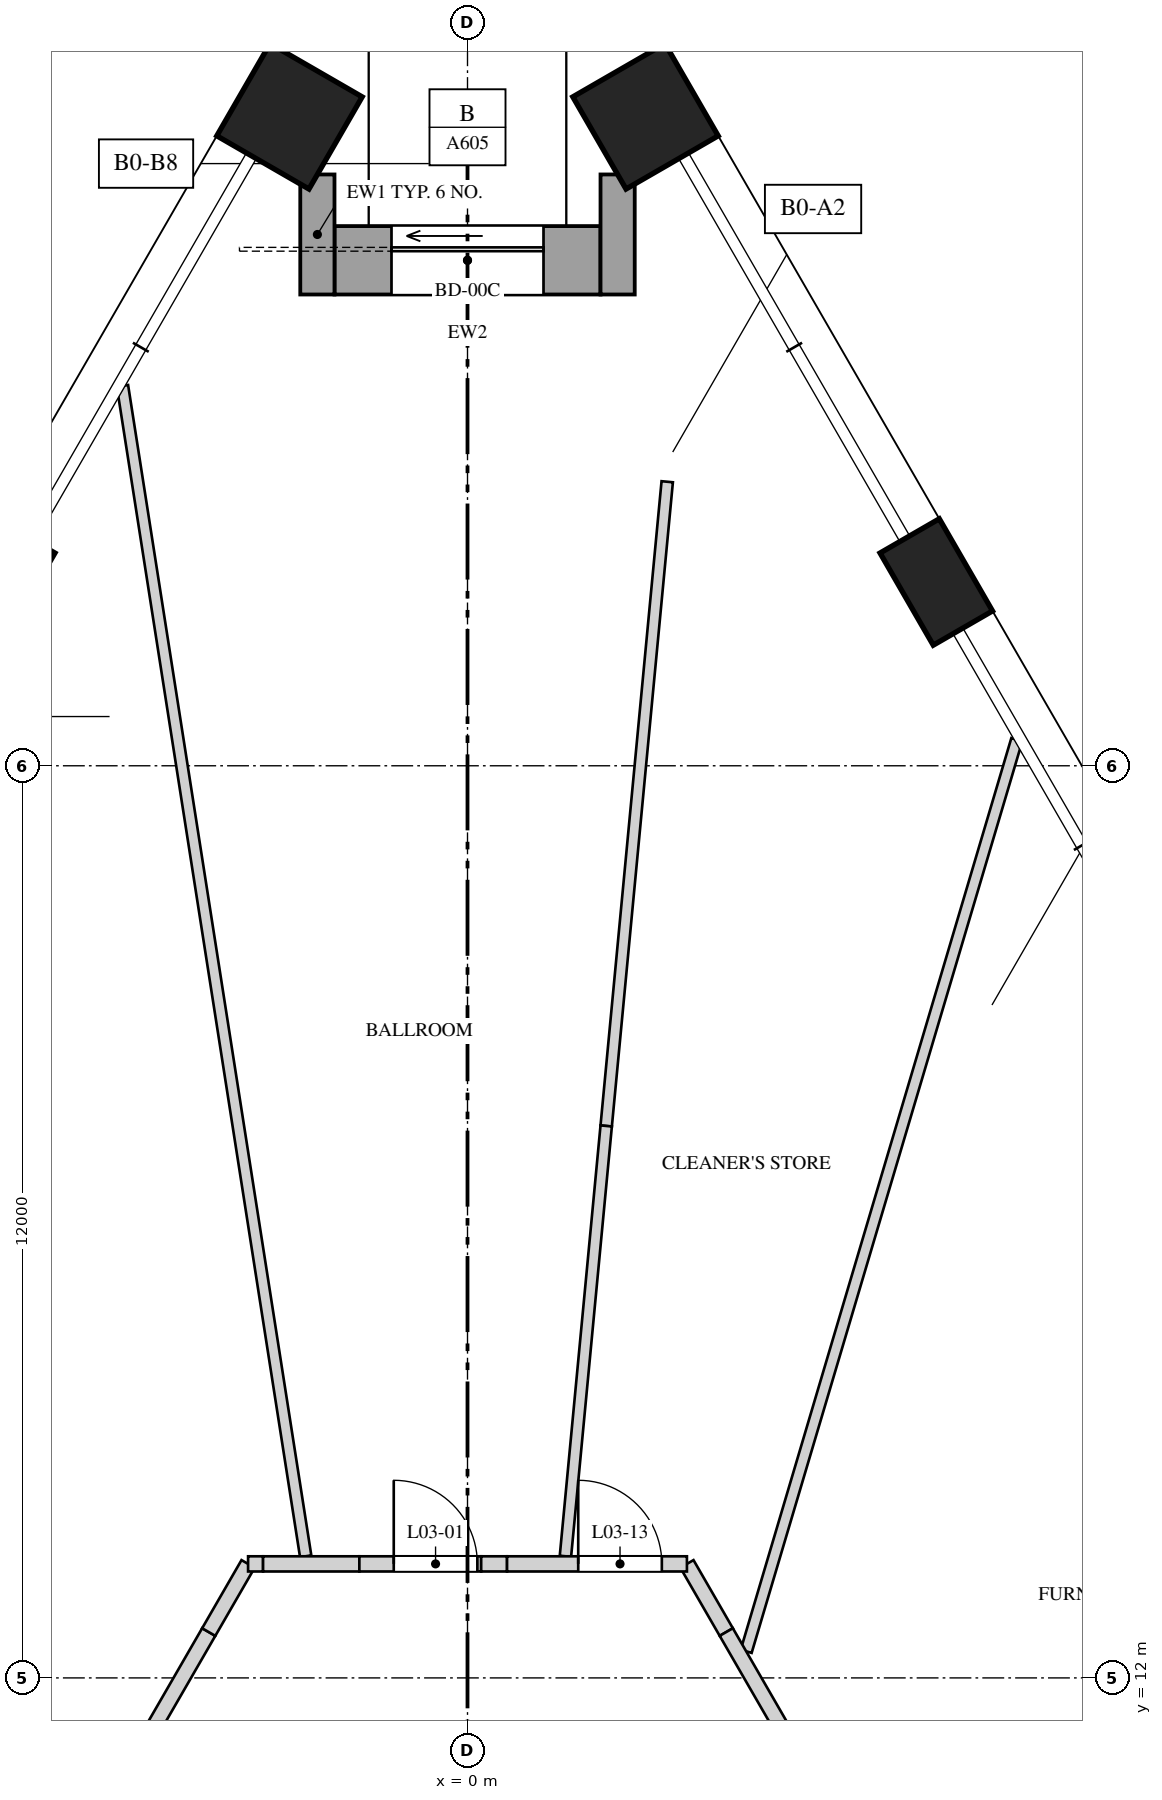
"""IFC4 building model, lengths in metres.
Left out: names, types, materials, properties, quantities, classifications, styles, units other than length and angle.
Written with IfcOpenShell. Run it as: python <this file> out.ifc"""

import sys

from ifc_helpers import new_model, si_unit, direction, frame, frame_2d, origin, origin_2d, place, context, subcontext, project, spatial, polyline, rectangle, outline, extrude, element, fill, save


model = new_model("IFC4")
c1 = context("Model", 3, precision=1e-05, world=origin(), true_north=direction((0.0, 1.0)))
c2 = subcontext(c1, "Body", "Model", "MODEL_VIEW")
j1 = project(units=[si_unit("LENGTHUNIT", "METRE"), si_unit("PLANEANGLEUNIT", "RADIAN")], contexts=[c1])
p1 = place(None, origin())
s1 = spatial("IfcSite", under=j1, at=p1, CompositionType="ELEMENT")
p2 = place(p1, origin())
s2 = spatial("IfcBuilding", under=s1, at=p2, CompositionType="ELEMENT")
p3 = place(p2, frame((0.0, 0.0, 20.0)))
s3 = spatial("IfcBuildingStorey", under=s2, at=p3, CompositionType="ELEMENT", Elevation=20.0)
p4 = place(p3, frame((-2.342, 32.544, 0.0), z_axis=(0.0, 0.0, 1.0), x_axis=(-0.5, -0.866025403784, 0.0)))
e1 = element("IfcColumn", 1, at=p4, inside=s3, PredefinedType="COLUMN", context=c2, shape_type="SweptSolid", body=[
    extrude(rectangle(XDim=1.4, YDim=1.4, at=origin_2d()), origin(), (0.0, 0.0, 1.0), 5.0),
])
for number, where, z_axis, x_axis in (
    (2, (-6.167, 26.418, 0.0), (0.0, 0.0, 1.0), (-0.5, -0.866, 0.0)),
    (3, (6.167, 26.418, 0.0), (0.0, 0.0, 1.0), (-0.5, 0.866, 0.0)),
):
    element("IfcColumn", number, at=place(p3, frame(where, z_axis=z_axis, x_axis=x_axis)), inside=s3, PredefinedType="COLUMN", context=c2, shape_type="SweptSolid", body=[
        extrude(rectangle(XDim=1.4, YDim=0.9, at=origin_2d()), origin(), (0.0, 0.0, 1.0), 5.0),
    ])
p5 = place(p3, frame((2.342, 32.544, 0.0), z_axis=(0.0, 0.0, 1.0), x_axis=(-0.5, 0.866025403784, 0.0)))
e4 = element("IfcColumn", 4, at=p5, inside=s3, PredefinedType="COLUMN", context=c2, shape_type="SweptSolid", body=[
    extrude(rectangle(XDim=1.4, YDim=1.4, at=origin_2d()), origin(), (0.0, 0.0, 1.0), 5.0),
])
p6 = place(p3, frame((-1.75, 30.65, 0.0), z_axis=(0.0, 0.0, 1.0), x_axis=(1.0, 0.0, 0.0)))
e5 = element("IfcWall", 5, at=p6, inside=s3, PredefinedType="SOLIDWALL", context=c2, shape_type="SweptSolid", body=[
    extrude(rectangle(XDim=3.5, YDim=0.9, at=frame_2d((1.75, 0.0))), origin(), (0.0, 0.0, 1.0), 4.3),
])
p7 = place(p6, frame((0.75, 0.0, 0.0)))
e6 = element("IfcOpeningElement", 6, at=p7, cuts=e5, PredefinedType="OPENING", context=c2, shape_type="SweptSolid", body=[
    extrude(rectangle(XDim=2.0, YDim=2.4, at=frame_2d((1.0, 1.2))), frame((0.0, 0.46, 0.0), z_axis=(0.0, -1.0, 0.0), x_axis=(1.0, 0.0, 0.0)), (0.0, 0.0, 1.0), 0.92),
])
for number, where, z_axis, x_axis in (
    (7, (-1.975, 31.779, 0.0), (0.0, 0.0, 1.0), (0.0, -1.0, 0.0)),
    (8, (1.975, 31.779, 0.0), (0.0, 0.0, 1.0), (0.0, -1.0, 0.0)),
):
    element("IfcWall", number, at=place(p3, frame(where, z_axis=z_axis, x_axis=x_axis)), inside=s3, PredefinedType="SOLIDWALL", context=c2, shape_type="SweptSolid", body=[
        extrude(rectangle(XDim=1.579, YDim=0.45, at=frame_2d((0.79, 0.0))), origin(), (0.0, 0.0, 1.0), 2.55),
    ])
p8 = place(p3, frame((-2.129, 13.6, 0.0), z_axis=(0.0, 0.0, 1.0), x_axis=(-0.154659289673, 0.987967865934, 0.0)))
e9 = element("IfcWall", 9, at=p8, inside=s3, PredefinedType="PARTITIONING", context=c2, shape_type="SweptSolid", body=[
    extrude(rectangle(XDim=15.585, YDim=0.15, at=frame_2d((7.792, 0.0))), origin(), (0.0, 0.0, 1.0), 4.65),
])
p9 = place(p3, frame((2.628, 27.737, 0.0), z_axis=(0.0, 0.0, 1.0), x_axis=(-0.094320531398, -0.995541881267, 0.0)))
e10 = element("IfcWall", 10, at=p9, inside=s3, PredefinedType="PARTITIONING", context=c2, shape_type="SweptSolid", body=[
    extrude(rectangle(XDim=8.513, YDim=0.15, at=frame_2d((4.257, 0.0))), origin(), (0.0, 0.0, 1.0), 4.65),
])
p10 = place(p3, frame((1.825, 19.261, 0.0), z_axis=(0.0, 0.0, 1.0), x_axis=(-0.094320818209, -0.995541854094, 0.0)))
e11 = element("IfcWall", 11, at=p10, inside=s3, PredefinedType="PARTITIONING", context=c2, shape_type="SweptSolid", body=[
    extrude(rectangle(XDim=5.687, YDim=0.15, at=frame_2d((2.843, 0.0))), origin(), (0.0, 0.0, 1.0), 3.55),
])
p11 = place(p3, frame((3.666, 12.35, 0.0), z_axis=(0.0, 0.0, 1.0), x_axis=(0.284585958586, 0.958650526613, 0.0)))
e12 = element("IfcWall", 12, at=p11, inside=s3, PredefinedType="PARTITIONING", context=c2, shape_type="SweptSolid", body=[
    extrude(rectangle(XDim=12.51, YDim=0.15, at=frame_2d((6.255, 0.0))), origin(), (0.0, 0.0, 1.0), 4.65),
])
p12 = place(p3, frame((2.887, 13.5, 0.0), z_axis=(0.0, 0.0, 1.0), x_axis=(0.499994660107, -0.866028486751, 0.0)))
e13 = element("IfcWall", 13, at=p12, inside=s3, PredefinedType="SOLIDWALL", context=c2, shape_type="SweptSolid", body=[
    extrude(rectangle(XDim=1.035, YDim=0.2, at=frame_2d((0.518, 0.0))), origin(), (0.0, 0.0, 1.0), 3.55),
])
for number, where, z_axis, x_axis in (
    (14, (3.404, 12.604, 0.0), (0.0, 0.0, 1.0), (0.5, -0.866, 0.0)),
    (15, (-4.812, 10.165, 0.0), (0.0, 0.0, 1.0), (0.5, 0.866, 0.0)),
):
    element("IfcWall", number, at=place(p3, frame(where, z_axis=z_axis, x_axis=x_axis)), inside=s3, PredefinedType="SOLIDWALL", context=c2, shape_type="SweptSolid", body=[
        extrude(rectangle(XDim=2.815, YDim=0.2, at=frame_2d((1.408, 0.0))), origin(), (0.0, 0.0, 1.0), 4.65),
    ])
p13 = place(p3, frame((-3.404, 12.604, 0.0), z_axis=(0.0, 0.0, 1.0), x_axis=(0.499994660107, 0.866028486751, 0.0)))
e16 = element("IfcWall", 16, at=p13, inside=s3, PredefinedType="SOLIDWALL", context=c2, shape_type="SweptSolid", body=[
    extrude(rectangle(XDim=1.035, YDim=0.2, at=frame_2d((0.518, 0.0))), origin(), (0.0, 0.0, 1.0), 3.55),
])
p14 = place(p3, frame((-2.887, 13.5, 0.0), z_axis=(0.0, 0.0, 1.0), x_axis=(1.0, 0.0, 0.0)))
e17 = element("IfcWall", 17, at=p14, inside=s3, PredefinedType="SOLIDWALL", context=c2, shape_type="SweptSolid", body=[
    extrude(rectangle(XDim=0.197, YDim=0.2, at=frame_2d((0.099, 0.0))), origin(), (0.0, 0.0, 1.0), 3.55),
])
p15 = place(p3, frame((-2.689, 13.5, 0.0), z_axis=(0.0, 0.0, 1.0), x_axis=(1.0, 0.0, 0.0)))
e18 = element("IfcWall", 18, at=p15, inside=s3, PredefinedType="SOLIDWALL", context=c2, shape_type="SweptSolid", body=[
    extrude(rectangle(XDim=1.267, YDim=0.2, at=frame_2d((0.633, 0.0))), origin(), (0.0, 0.0, 1.0), 4.65),
])
p16 = place(p3, frame((-1.423, 13.5, 0.0), z_axis=(0.0, 0.0, 1.0), x_axis=(1.0, 0.0, 0.0)))
e19 = element("IfcWall", 19, at=p16, inside=s3, PredefinedType="SOLIDWALL", context=c2, shape_type="SweptSolid", body=[
    extrude(outline(polyline([(0.0, 0.0), (1.602, 0.0), (1.602, 4.65), (0.902, 4.65), (0.902, 3.55), (0.0, 3.55), (0.0, 0.0)])), frame((0.0, 0.1, 0.0), z_axis=(0.0, -1.0, 0.0), x_axis=(1.0, 0.0, 0.0)), (0.0, 0.0, 1.0), 0.2),
])
p17 = place(p16, frame((0.452, 0.0, 0.0)))
e20 = element("IfcOpeningElement", 20, at=p17, cuts=e19, PredefinedType="OPENING", context=c2, shape_type="SweptSolid", body=[
    extrude(rectangle(XDim=1.1, YDim=2.4, at=frame_2d((0.55, 1.2))), frame((0.0, 0.11, 0.0), z_axis=(0.0, -1.0, 0.0), x_axis=(1.0, 0.0, 0.0)), (0.0, 0.0, 1.0), 0.22),
])
p18 = place(p3, frame((0.18, 13.5, 0.0), z_axis=(0.0, 0.0, 1.0), x_axis=(1.0, 0.0, 0.0)))
e21 = element("IfcWall", 21, at=p18, inside=s3, PredefinedType="SOLIDWALL", context=c2, shape_type="SweptSolid", body=[
    extrude(rectangle(XDim=0.341, YDim=0.2, at=frame_2d((0.17, 0.0))), origin(), (0.0, 0.0, 1.0), 4.65),
])
p19 = place(p3, frame((0.52, 13.5, 0.0), z_axis=(0.0, 0.0, 1.0), x_axis=(1.0, 0.0, 0.0)))
e22 = element("IfcWall", 22, at=p19, inside=s3, PredefinedType="SOLIDWALL", context=c2, shape_type="SweptSolid", body=[
    extrude(outline(polyline([(0.0, 0.0), (2.366, 0.0), (2.366, 3.55), (2.169, 3.55), (2.169, 4.65), (0.902, 4.65), (0.902, 3.55), (0.0, 3.55), (0.0, 0.0)])), frame((0.0, 0.1, 0.0), z_axis=(0.0, -1.0, 0.0), x_axis=(1.0, 0.0, 0.0)), (0.0, 0.0, 1.0), 0.2),
])
p20 = place(p19, frame((0.936, 0.0, 0.0)))
e23 = element("IfcOpeningElement", 23, at=p20, cuts=e22, PredefinedType="OPENING", context=c2, shape_type="SweptSolid", body=[
    extrude(rectangle(XDim=1.1, YDim=2.4, at=frame_2d((0.55, 1.2))), frame((0.0, 0.11, 0.0), z_axis=(0.0, -1.0, 0.0), x_axis=(1.0, 0.0, 0.0)), (0.0, 0.0, 1.0), 0.22),
])
p21 = place(p7, origin())
e24 = element("IfcDoor", 24, at=p21, inside=s3, OperationType="SLIDING_TO_LEFT", PredefinedType="DOOR", context=c2, shape_type="SweptSolid", body=[
    extrude(rectangle(XDim=2.0, YDim=2.4, at=frame_2d((1.0, 1.2))), frame((0.0, 0.025, 0.0), z_axis=(0.0, -1.0, 0.0), x_axis=(1.0, 0.0, 0.0)), (0.0, 0.0, 1.0), 0.05),
])
fill(e6, e24)
p22 = place(p17, origin())
e25 = element("IfcDoor", 25, at=p22, inside=s3, OperationType="SINGLE_SWING_LEFT", PredefinedType="DOOR", context=c2, shape_type="SweptSolid", body=[
    extrude(rectangle(XDim=1.1, YDim=2.4, at=frame_2d((0.55, 1.2))), frame((0.0, 0.025, 0.0), z_axis=(0.0, -1.0, 0.0), x_axis=(1.0, 0.0, 0.0)), (0.0, 0.0, 1.0), 0.05),
])
fill(e20, e25)
p23 = place(p20, origin())
e26 = element("IfcDoor", 26, at=p23, inside=s3, OperationType="SINGLE_SWING_LEFT", PredefinedType="DOOR", context=c2, shape_type="SweptSolid", body=[
    extrude(rectangle(XDim=1.1, YDim=2.4, at=frame_2d((0.55, 1.2))), frame((0.0, 0.025, 0.0), z_axis=(0.0, -1.0, 0.0), x_axis=(1.0, 0.0, 0.0)), (0.0, 0.0, 1.0), 0.05),
])
fill(e23, e26)
save(model, sys.argv[1])
